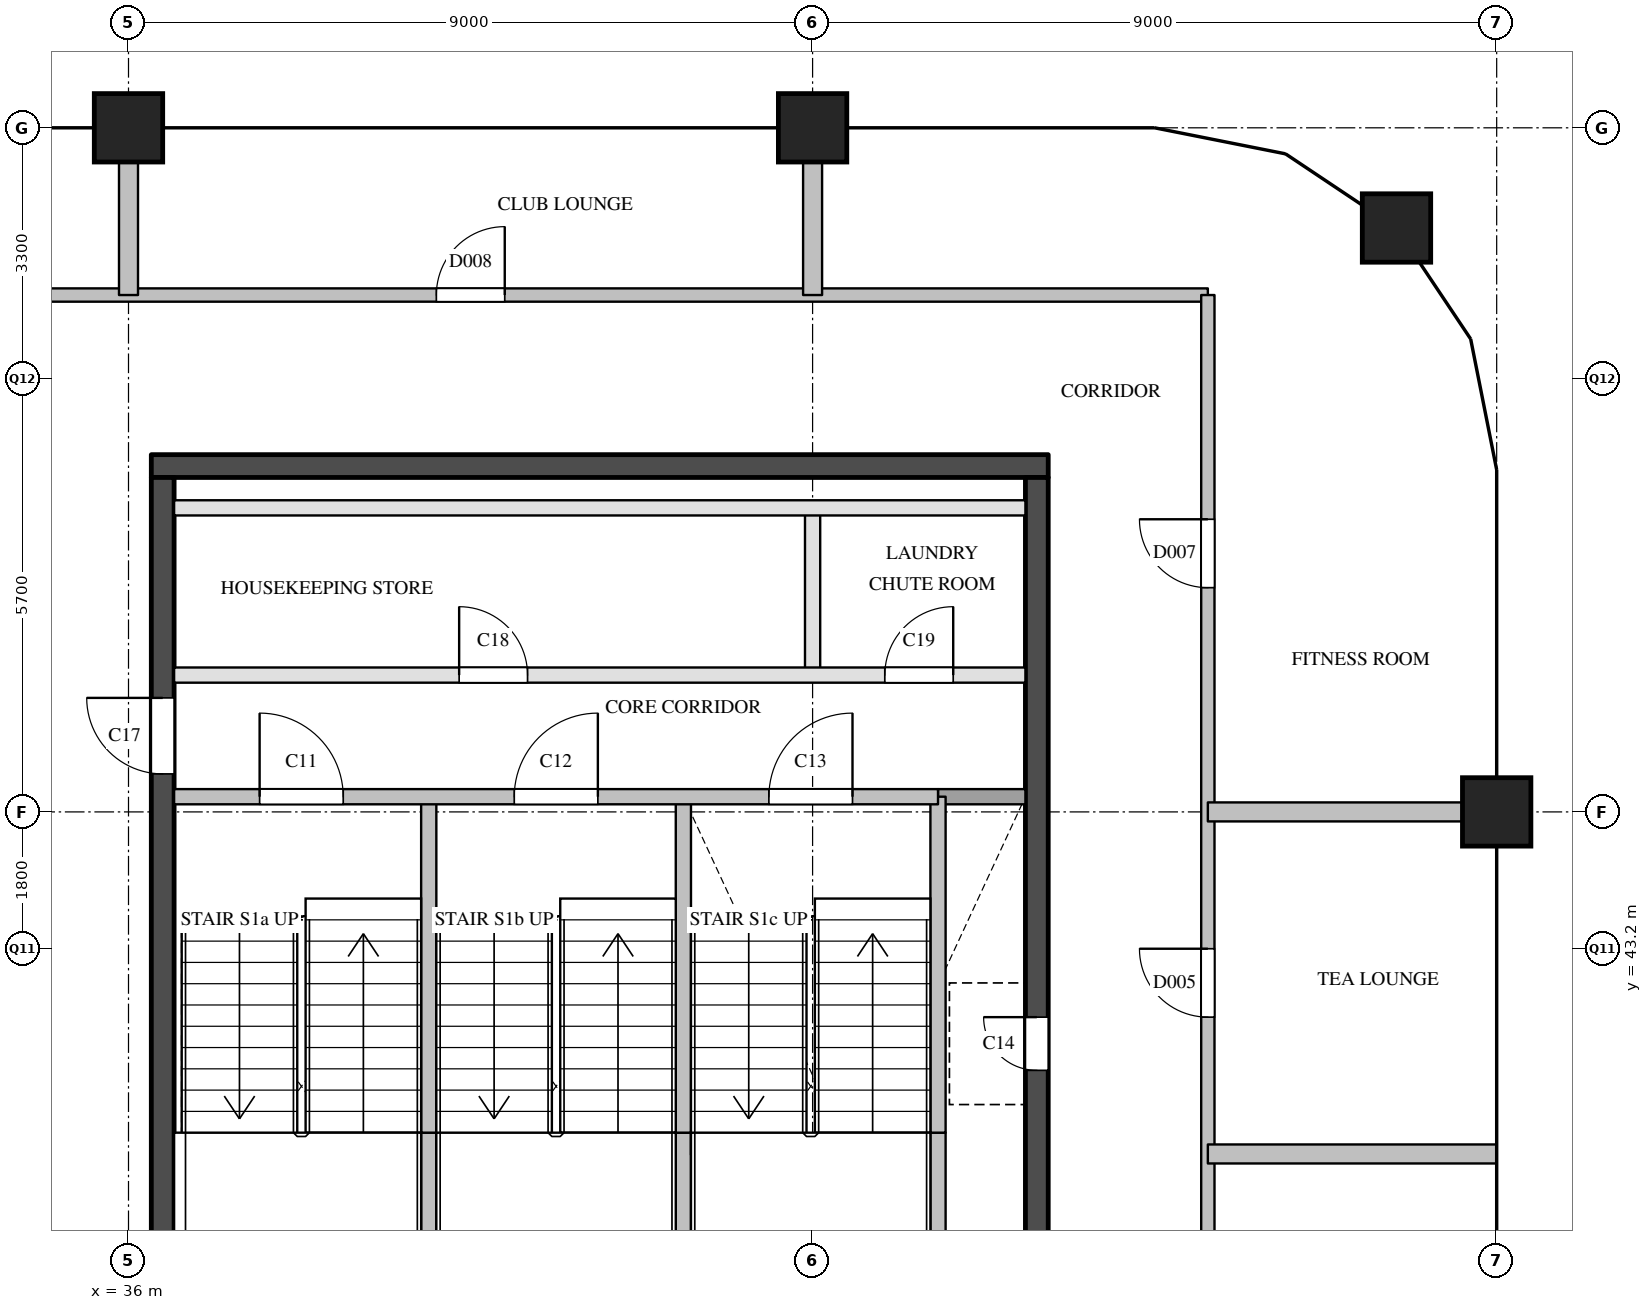
"""IFC4 building model, lengths in metres.
Left out: names, types, materials, properties, quantities, classifications, styles, units other than length and angle.
Written with IfcOpenShell. Run it as: python <this file> out.ifc"""

import sys

from ifc_helpers import new_model, si_unit, direction, frame, frame_2d, origin, origin_2d, place, context, subcontext, project, spatial, rectangle, extrude, element, fill, save


model = new_model("IFC4")
c1 = context("Model", 3, precision=1e-05, world=origin(), true_north=direction((0.0, 1.0)))
c2 = subcontext(c1, "Body", "Model", "MODEL_VIEW")
j1 = project(units=[si_unit("LENGTHUNIT", "METRE"), si_unit("PLANEANGLEUNIT", "RADIAN")], contexts=[c1])
p1 = place(None, origin())
s1 = spatial("IfcSite", under=j1, at=p1, CompositionType="ELEMENT")
p2 = place(p1, origin())
s2 = spatial("IfcBuilding", under=s1, at=p2, CompositionType="ELEMENT")
p3 = place(p2, frame((0.0, 0.0, 316.8)))
s3 = spatial("IfcBuildingStorey", under=s2, at=p3, CompositionType="ELEMENT", Elevation=316.8)
for number, where, z_axis, x_axis in (
    (1, (36.0, 54.0, 0.0), (0.0, 0.0, 1.0), (1.0, 0.0, 0.0)),
    (2, (45.0, 54.0, 0.0), (0.0, 0.0, 1.0), (1.0, 0.0, 0.0)),
    (3, (54.0, 45.0, 0.0), (0.0, 0.0, 1.0), (1.0, 0.0, 0.0)),
    (4, (52.682, 52.682, 0.0), (0.0, 0.0, 1.0), (1.0, 0.0, 0.0)),
):
    element("IfcColumn", number, at=place(p3, frame(where, z_axis=z_axis, x_axis=x_axis)), inside=s3, PredefinedType="COLUMN", context=c2, shape_type="SweptSolid", body=[
        extrude(rectangle(XDim=0.9, YDim=0.9, at=origin_2d()), origin(), (0.0, 0.0, 1.0), 3.9),
    ])
p4 = place(p3, frame((36.3, 49.55, 0.0), z_axis=(0.0, 0.0, 1.0), x_axis=(1.0, 0.0, 0.0)))
e5 = element("IfcWall", 5, at=p4, inside=s3, PredefinedType="SHEAR", context=c2, shape_type="SweptSolid", body=[
    extrude(rectangle(XDim=11.8, YDim=0.3, at=frame_2d((5.9, 0.0))), origin(), (0.0, 0.0, 1.0), 3.6),
])
p5 = place(p3, frame((36.45, 29.1, 0.0), z_axis=(0.0, 0.0, 1.0), x_axis=(0.0, 1.0, 0.0)))
e6 = element("IfcWall", 6, at=p5, inside=s3, PredefinedType="SHEAR", context=c2, shape_type="SweptSolid", body=[
    extrude(rectangle(XDim=20.3, YDim=0.3, at=frame_2d((10.15, 0.0))), origin(), (0.0, 0.0, 1.0), 3.6),
])
p6 = place(p5, frame((3.6, 0.0, 0.0)))
e7 = element("IfcOpeningElement", 7, at=p6, cuts=e6, PredefinedType="OPENING", context=c2, shape_type="SweptSolid", body=[
    extrude(rectangle(XDim=1.8, YDim=2.1, at=frame_2d((0.9, 1.05))), frame((0.0, 0.16, 0.0), z_axis=(0.0, -1.0, 0.0), x_axis=(1.0, 0.0, 0.0)), (0.0, 0.0, 1.0), 0.32),
])
p7 = place(p5, frame((16.4, 0.0, 0.0)))
e8 = element("IfcOpeningElement", 8, at=p7, cuts=e6, PredefinedType="OPENING", context=c2, shape_type="SweptSolid", body=[
    extrude(rectangle(XDim=1.0, YDim=2.1, at=frame_2d((0.5, 1.05))), frame((0.0, 0.16, 0.0), z_axis=(0.0, -1.0, 0.0), x_axis=(1.0, 0.0, 0.0)), (0.0, 0.0, 1.0), 0.32),
])
p8 = place(p3, frame((47.95, 29.1, 0.0), z_axis=(0.0, 0.0, 1.0), x_axis=(0.0, 1.0, 0.0)))
e9 = element("IfcWall", 9, at=p8, inside=s3, PredefinedType="SHEAR", context=c2, shape_type="SweptSolid", body=[
    extrude(rectangle(XDim=20.3, YDim=0.3, at=frame_2d((10.15, 0.0))), origin(), (0.0, 0.0, 1.0), 3.6),
])
p9 = place(p8, frame((12.5, 0.0, 0.0)))
e10 = element("IfcOpeningElement", 10, at=p9, cuts=e9, PredefinedType="OPENING", context=c2, shape_type="SweptSolid", body=[
    extrude(rectangle(XDim=0.7, YDim=2.1, at=frame_2d((0.35, 1.05))), frame((0.0, 0.16, 0.0), z_axis=(0.0, -1.0, 0.0), x_axis=(1.0, 0.0, 0.0)), (0.0, 0.0, 1.0), 0.32),
])
p10 = place(p8, frame((3.9, 0.0, 0.0)))
e11 = element("IfcOpeningElement", 11, at=p10, cuts=e9, PredefinedType="OPENING", context=c2, shape_type="SweptSolid", body=[
    extrude(rectangle(XDim=1.8, YDim=2.1, at=frame_2d((0.9, 1.05))), frame((0.0, 0.16, 0.0), z_axis=(0.0, -1.0, 0.0), x_axis=(1.0, 0.0, 0.0)), (0.0, 0.0, 1.0), 0.32),
])
p11 = place(p3, frame((39.95, 39.0, 0.0), z_axis=(0.0, 0.0, 1.0), x_axis=(0.0, 1.0, 0.0)))
e12 = element("IfcWall", 12, at=p11, inside=s3, PredefinedType="SOLIDWALL", context=c2, shape_type="SweptSolid", body=[
    extrude(rectangle(XDim=1.78, YDim=0.2, at=frame_2d((0.89, 0.0))), origin(), (0.0, 0.0, 1.0), 3.6),
])
p12 = place(p3, frame((39.95, 40.78, 0.0), z_axis=(0.0, 0.0, 1.0), x_axis=(0.0, 1.0, 0.0)))
e13 = element("IfcWall", 13, at=p12, inside=s3, PredefinedType="SOLIDWALL", context=c2, shape_type="SweptSolid", body=[
    extrude(rectangle(XDim=4.42, YDim=0.2, at=frame_2d((2.21, 0.0))), origin(), (0.0, 0.0, 1.0), 3.6),
])
p13 = place(p3, frame((43.3, 39.0, 0.0), z_axis=(0.0, 0.0, 1.0), x_axis=(0.0, 1.0, 0.0)))
e14 = element("IfcWall", 14, at=p13, inside=s3, PredefinedType="SOLIDWALL", context=c2, shape_type="SweptSolid", body=[
    extrude(rectangle(XDim=1.78, YDim=0.2, at=frame_2d((0.89, 0.0))), origin(), (0.0, 0.0, 1.0), 3.6),
])
p14 = place(p3, frame((43.3, 40.78, 0.0), z_axis=(0.0, 0.0, 1.0), x_axis=(0.0, 1.0, 0.0)))
e15 = element("IfcWall", 15, at=p14, inside=s3, PredefinedType="SOLIDWALL", context=c2, shape_type="SweptSolid", body=[
    extrude(rectangle(XDim=4.42, YDim=0.2, at=frame_2d((2.21, 0.0))), origin(), (0.0, 0.0, 1.0), 3.6),
])
p15 = place(p3, frame((45.0, 46.8, 0.0), z_axis=(0.0, 0.0, 1.0), x_axis=(0.0, 1.0, 0.0)))
e16 = element("IfcWall", 16, at=p15, inside=s3, PredefinedType="PARTITIONING", context=c2, shape_type="SweptSolid", body=[
    extrude(rectangle(XDim=2.2, YDim=0.2, at=frame_2d((1.1, 0.0))), origin(), (0.0, 0.0, 1.0), 3.6),
])
p16 = place(p3, frame((46.65, 39.0, 0.0), z_axis=(0.0, 0.0, 1.0), x_axis=(0.0, 1.0, 0.0)))
e17 = element("IfcWall", 17, at=p16, inside=s3, PredefinedType="SOLIDWALL", context=c2, shape_type="SweptSolid", body=[
    extrude(rectangle(XDim=1.78, YDim=0.2, at=frame_2d((0.89, 0.0))), origin(), (0.0, 0.0, 1.0), 3.6),
])
p17 = place(p3, frame((46.65, 40.78, 0.0), z_axis=(0.0, 0.0, 1.0), x_axis=(0.0, 1.0, 0.0)))
e18 = element("IfcWall", 18, at=p17, inside=s3, PredefinedType="SOLIDWALL", context=c2, shape_type="SweptSolid", body=[
    extrude(rectangle(XDim=4.42, YDim=0.2, at=frame_2d((2.21, 0.0))), origin(), (0.0, 0.0, 1.0), 3.6),
])
p18 = place(p3, frame((46.65, 45.2, 0.0), z_axis=(0.0, 0.0, 1.0), x_axis=(1.0, 0.0, 0.0)))
e19 = element("IfcWall", 19, at=p18, inside=s3, PredefinedType="SOLIDWALL", context=c2, shape_type="SweptSolid", body=[
    extrude(rectangle(XDim=1.15, YDim=0.2, at=frame_2d((0.575, 0.0))), origin(), (0.0, 0.0, 1.0), 3.6),
])
p19 = place(p3, frame((36.6, 45.2, 0.0), z_axis=(0.0, 0.0, 1.0), x_axis=(1.0, 0.0, 0.0)))
e20 = element("IfcWall", 20, at=p19, inside=s3, PredefinedType="SOLIDWALL", context=c2, shape_type="SweptSolid", body=[
    extrude(rectangle(XDim=10.05, YDim=0.2, at=frame_2d((5.025, 0.0))), origin(), (0.0, 0.0, 1.0), 3.6),
])
p20 = place(p19, frame((1.125, 0.0, 0.0)))
e21 = element("IfcOpeningElement", 21, at=p20, cuts=e20, PredefinedType="OPENING", context=c2, shape_type="SweptSolid", body=[
    extrude(rectangle(XDim=1.1, YDim=2.1, at=frame_2d((0.55, 1.05))), frame((0.0, 0.11, 0.0), z_axis=(0.0, -1.0, 0.0), x_axis=(1.0, 0.0, 0.0)), (0.0, 0.0, 1.0), 0.22),
])
p21 = place(p19, frame((4.475, 0.0, 0.0)))
e22 = element("IfcOpeningElement", 22, at=p21, cuts=e20, PredefinedType="OPENING", context=c2, shape_type="SweptSolid", body=[
    extrude(rectangle(XDim=1.1, YDim=2.1, at=frame_2d((0.55, 1.05))), frame((0.0, 0.11, 0.0), z_axis=(0.0, -1.0, 0.0), x_axis=(1.0, 0.0, 0.0)), (0.0, 0.0, 1.0), 0.22),
])
p22 = place(p19, frame((7.825, 0.0, 0.0)))
e23 = element("IfcOpeningElement", 23, at=p22, cuts=e20, PredefinedType="OPENING", context=c2, shape_type="SweptSolid", body=[
    extrude(rectangle(XDim=1.1, YDim=2.1, at=frame_2d((0.55, 1.05))), frame((0.0, 0.11, 0.0), z_axis=(0.0, -1.0, 0.0), x_axis=(1.0, 0.0, 0.0)), (0.0, 0.0, 1.0), 0.22),
])
p23 = place(p3, frame((36.6, 46.8, 0.0), z_axis=(0.0, 0.0, 1.0), x_axis=(1.0, 0.0, 0.0)))
e24 = element("IfcWall", 24, at=p23, inside=s3, PredefinedType="PARTITIONING", context=c2, shape_type="SweptSolid", body=[
    extrude(rectangle(XDim=11.2, YDim=0.2, at=frame_2d((5.6, 0.0))), origin(), (0.0, 0.0, 1.0), 3.6),
])
p24 = place(p23, frame((3.75, 0.0, 0.0)))
e25 = element("IfcOpeningElement", 25, at=p24, cuts=e24, PredefinedType="OPENING", context=c2, shape_type="SweptSolid", body=[
    extrude(rectangle(XDim=0.9, YDim=2.1, at=frame_2d((0.45, 1.05))), frame((0.0, 0.11, 0.0), z_axis=(0.0, -1.0, 0.0), x_axis=(1.0, 0.0, 0.0)), (0.0, 0.0, 1.0), 0.22),
])
p25 = place(p23, frame((9.35, 0.0, 0.0)))
e26 = element("IfcOpeningElement", 26, at=p25, cuts=e24, PredefinedType="OPENING", context=c2, shape_type="SweptSolid", body=[
    extrude(rectangle(XDim=0.9, YDim=2.1, at=frame_2d((0.45, 1.05))), frame((0.0, 0.11, 0.0), z_axis=(0.0, -1.0, 0.0), x_axis=(1.0, 0.0, 0.0)), (0.0, 0.0, 1.0), 0.22),
])
p26 = place(p3, frame((36.6, 49.0, 0.0), z_axis=(0.0, 0.0, 1.0), x_axis=(1.0, 0.0, 0.0)))
e27 = element("IfcWall", 27, at=p26, inside=s3, PredefinedType="PARTITIONING", context=c2, shape_type="SweptSolid", body=[
    extrude(rectangle(XDim=11.2, YDim=0.2, at=frame_2d((5.6, 0.0))), origin(), (0.0, 0.0, 1.0), 3.6),
])
p27 = place(p3, frame((34.2, 51.8, 0.0), z_axis=(0.0, 0.0, 1.0), x_axis=(1.0, 0.0, 0.0)))
e28 = element("IfcWall", 28, at=p27, inside=s3, PredefinedType="PARTITIONING", context=c2, shape_type="SweptSolid", body=[
    extrude(rectangle(XDim=16.0, YDim=0.175, at=frame_2d((8.0, 0.0))), origin(), (0.0, 0.0, 1.0), 3.6),
])
p28 = place(p27, frame((5.85, 0.0, 0.0)))
e29 = element("IfcOpeningElement", 29, at=p28, cuts=e28, PredefinedType="OPENING", context=c2, shape_type="SweptSolid", body=[
    extrude(rectangle(XDim=0.9, YDim=2.1, at=frame_2d((0.45, 1.05))), frame((0.0, 0.097, 0.0), z_axis=(0.0, -1.0, 0.0), x_axis=(1.0, 0.0, 0.0)), (0.0, 0.0, 1.0), 0.195),
])
p29 = place(p3, frame((50.2, 28.5, 0.0), z_axis=(0.0, 0.0, 1.0), x_axis=(0.0, 1.0, 0.0)))
e30 = element("IfcWall", 30, at=p29, inside=s3, PredefinedType="PARTITIONING", context=c2, shape_type="SweptSolid", body=[
    extrude(rectangle(XDim=23.3, YDim=0.175, at=frame_2d((11.65, 0.0))), origin(), (0.0, 0.0, 1.0), 3.6),
])
p30 = place(p29, frame((3.3, 0.0, 0.0)))
e31 = element("IfcOpeningElement", 31, at=p30, cuts=e30, PredefinedType="OPENING", context=c2, shape_type="SweptSolid", body=[
    extrude(rectangle(XDim=0.9, YDim=2.1, at=frame_2d((0.45, 1.05))), frame((0.0, 0.097, 0.0), z_axis=(0.0, -1.0, 0.0), x_axis=(1.0, 0.0, 0.0)), (0.0, 0.0, 1.0), 0.195),
])
p31 = place(p29, frame((9.25, 0.0, 0.0)))
e32 = element("IfcOpeningElement", 32, at=p31, cuts=e30, PredefinedType="OPENING", context=c2, shape_type="SweptSolid", body=[
    extrude(rectangle(XDim=1.0, YDim=2.1, at=frame_2d((0.5, 1.05))), frame((0.0, 0.097, 0.0), z_axis=(0.0, -1.0, 0.0), x_axis=(1.0, 0.0, 0.0)), (0.0, 0.0, 1.0), 0.195),
])
p32 = place(p29, frame((13.8, 0.0, 0.0)))
e33 = element("IfcOpeningElement", 33, at=p32, cuts=e30, PredefinedType="OPENING", context=c2, shape_type="SweptSolid", body=[
    extrude(rectangle(XDim=0.9, YDim=2.1, at=frame_2d((0.45, 1.05))), frame((0.0, 0.097, 0.0), z_axis=(0.0, -1.0, 0.0), x_axis=(1.0, 0.0, 0.0)), (0.0, 0.0, 1.0), 0.195),
])
p33 = place(p29, frame((19.45, 0.0, 0.0)))
e34 = element("IfcOpeningElement", 34, at=p33, cuts=e30, PredefinedType="OPENING", context=c2, shape_type="SweptSolid", body=[
    extrude(rectangle(XDim=0.9, YDim=2.1, at=frame_2d((0.45, 1.05))), frame((0.0, 0.097, 0.0), z_axis=(0.0, -1.0, 0.0), x_axis=(1.0, 0.0, 0.0)), (0.0, 0.0, 1.0), 0.195),
])
p34 = place(p3, frame((50.2, 40.5, 0.0), z_axis=(0.0, 0.0, 1.0), x_axis=(1.0, 0.0, 0.0)))
e35 = element("IfcWall", 35, at=p34, inside=s3, PredefinedType="PARTITIONING", context=c2, shape_type="SweptSolid", body=[
    extrude(rectangle(XDim=3.8, YDim=0.25, at=frame_2d((1.9, 0.0))), origin(), (0.0, 0.0, 1.0), 2.35),
])
p35 = place(p3, frame((50.2, 45.0, 0.0), z_axis=(0.0, 0.0, 1.0), x_axis=(1.0, 0.0, 0.0)))
e36 = element("IfcWall", 36, at=p35, inside=s3, PredefinedType="PARTITIONING", context=c2, shape_type="SweptSolid", body=[
    extrude(rectangle(XDim=3.8, YDim=0.25, at=frame_2d((1.9, 0.0))), origin(), (0.0, 0.0, 1.0), 3.6),
])
for number, where, z_axis, x_axis in (
    (37, (36.0, 51.8, 0.0), (0.0, 0.0, 1.0), (0.0, 1.0, 0.0)),
    (38, (45.0, 51.8, 0.0), (0.0, 0.0, 1.0), (0.0, 1.0, 0.0)),
):
    element("IfcWall", number, at=place(p3, frame(where, z_axis=z_axis, x_axis=x_axis)), inside=s3, PredefinedType="PARTITIONING", context=c2, shape_type="SweptSolid", body=[
        extrude(rectangle(XDim=2.2, YDim=0.25, at=frame_2d((1.1, 0.0))), origin(), (0.0, 0.0, 1.0), 3.6),
    ])
p36 = place(p20, origin())
e39 = element("IfcDoor", 39, at=p36, inside=s3, OperationType="SINGLE_SWING_LEFT", PredefinedType="DOOR", context=c2, shape_type="SweptSolid", body=[
    extrude(rectangle(XDim=1.1, YDim=2.1, at=frame_2d((0.55, 1.05))), frame((0.0, 0.025, 0.0), z_axis=(0.0, -1.0, 0.0), x_axis=(1.0, 0.0, 0.0)), (0.0, 0.0, 1.0), 0.05),
])
fill(e21, e39)
p37 = place(p21, origin())
e40 = element("IfcDoor", 40, at=p37, inside=s3, OperationType="SINGLE_SWING_RIGHT", PredefinedType="DOOR", context=c2, shape_type="SweptSolid", body=[
    extrude(rectangle(XDim=1.1, YDim=2.1, at=frame_2d((0.55, 1.05))), frame((0.0, 0.025, 0.0), z_axis=(0.0, -1.0, 0.0), x_axis=(1.0, 0.0, 0.0)), (0.0, 0.0, 1.0), 0.05),
])
fill(e22, e40)
p38 = place(p22, origin())
e41 = element("IfcDoor", 41, at=p38, inside=s3, OperationType="SINGLE_SWING_RIGHT", PredefinedType="DOOR", context=c2, shape_type="SweptSolid", body=[
    extrude(rectangle(XDim=1.1, YDim=2.1, at=frame_2d((0.55, 1.05))), frame((0.0, 0.025, 0.0), z_axis=(0.0, -1.0, 0.0), x_axis=(1.0, 0.0, 0.0)), (0.0, 0.0, 1.0), 0.05),
])
fill(e23, e41)
p39 = place(p9, origin())
e42 = element("IfcDoor", 42, at=p39, inside=s3, OperationType="SINGLE_SWING_RIGHT", PredefinedType="DOOR", context=c2, shape_type="SweptSolid", body=[
    extrude(rectangle(XDim=0.7, YDim=2.1, at=frame_2d((0.35, 1.05))), frame((0.0, 0.025, 0.0), z_axis=(0.0, -1.0, 0.0), x_axis=(1.0, 0.0, 0.0)), (0.0, 0.0, 1.0), 0.05),
])
fill(e10, e42)
p40 = place(p7, origin())
e43 = element("IfcDoor", 43, at=p40, inside=s3, OperationType="SINGLE_SWING_RIGHT", PredefinedType="DOOR", context=c2, shape_type="SweptSolid", body=[
    extrude(rectangle(XDim=1.0, YDim=2.1, at=frame_2d((0.5, 1.05))), frame((0.0, 0.025, 0.0), z_axis=(0.0, -1.0, 0.0), x_axis=(1.0, 0.0, 0.0)), (0.0, 0.0, 1.0), 0.05),
])
fill(e8, e43)
p41 = place(p24, origin())
e44 = element("IfcDoor", 44, at=p41, inside=s3, OperationType="SINGLE_SWING_LEFT", PredefinedType="DOOR", context=c2, shape_type="SweptSolid", body=[
    extrude(rectangle(XDim=0.9, YDim=2.1, at=frame_2d((0.45, 1.05))), frame((0.0, 0.025, 0.0), z_axis=(0.0, -1.0, 0.0), x_axis=(1.0, 0.0, 0.0)), (0.0, 0.0, 1.0), 0.05),
])
fill(e25, e44)
p42 = place(p25, origin())
e45 = element("IfcDoor", 45, at=p42, inside=s3, OperationType="SINGLE_SWING_RIGHT", PredefinedType="DOOR", context=c2, shape_type="SweptSolid", body=[
    extrude(rectangle(XDim=0.9, YDim=2.1, at=frame_2d((0.45, 1.05))), frame((0.0, 0.025, 0.0), z_axis=(0.0, -1.0, 0.0), x_axis=(1.0, 0.0, 0.0)), (0.0, 0.0, 1.0), 0.05),
])
fill(e26, e45)
p43 = place(p32, origin())
e46 = element("IfcDoor", 46, at=p43, inside=s3, OperationType="SINGLE_SWING_RIGHT", PredefinedType="DOOR", context=c2, shape_type="SweptSolid", body=[
    extrude(rectangle(XDim=0.9, YDim=2.1, at=frame_2d((0.45, 1.05))), frame((0.0, 0.025, 0.0), z_axis=(0.0, -1.0, 0.0), x_axis=(1.0, 0.0, 0.0)), (0.0, 0.0, 1.0), 0.05),
])
fill(e33, e46)
p44 = place(p33, origin())
e47 = element("IfcDoor", 47, at=p44, inside=s3, OperationType="SINGLE_SWING_RIGHT", PredefinedType="DOOR", context=c2, shape_type="SweptSolid", body=[
    extrude(rectangle(XDim=0.9, YDim=2.1, at=frame_2d((0.45, 1.05))), frame((0.0, 0.025, 0.0), z_axis=(0.0, -1.0, 0.0), x_axis=(1.0, 0.0, 0.0)), (0.0, 0.0, 1.0), 0.05),
])
fill(e34, e47)
p45 = place(p28, origin())
e48 = element("IfcDoor", 48, at=p45, inside=s3, OperationType="SINGLE_SWING_RIGHT", PredefinedType="DOOR", context=c2, shape_type="SweptSolid", body=[
    extrude(rectangle(XDim=0.9, YDim=2.1, at=frame_2d((0.45, 1.05))), frame((0.0, 0.025, 0.0), z_axis=(0.0, -1.0, 0.0), x_axis=(1.0, 0.0, 0.0)), (0.0, 0.0, 1.0), 0.05),
])
fill(e29, e48)
save(model, sys.argv[1])
